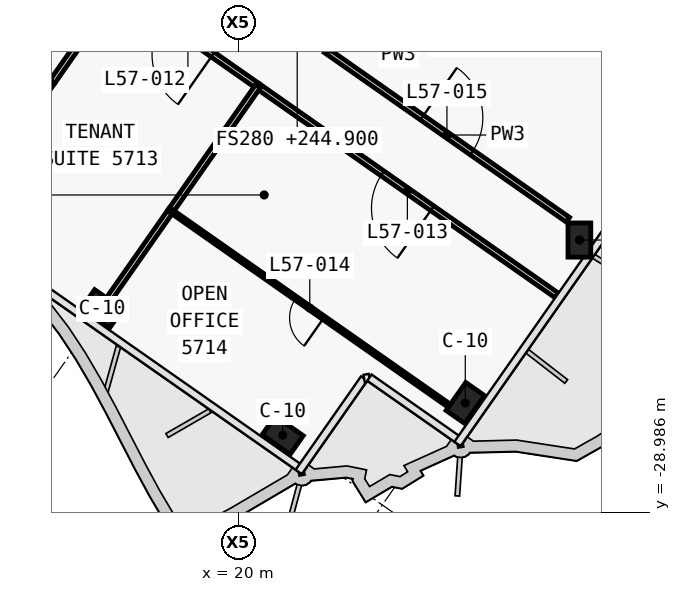
"""IFC4 building model, lengths in metres.
Left out: names, types, materials, properties, quantities, classifications, styles, units other than length and angle.
Written with IfcOpenShell. Run it as: python <this file> out.ifc"""

import sys

from ifc_helpers import new_model, si_unit, direction, frame, frame_2d, origin, origin_2d, place, context, subcontext, project, spatial, rectangle, extrude, clip, halfspace, element, fill, save


model = new_model("IFC4")
c1 = context("Model", 3, precision=1e-05, world=origin(), true_north=direction((0.0, 1.0)))
c2 = subcontext(c1, "Body", "Model", "MODEL_VIEW")
j1 = project(units=[si_unit("LENGTHUNIT", "METRE"), si_unit("PLANEANGLEUNIT", "RADIAN")], contexts=[c1])
p1 = place(None, origin())
s1 = spatial("IfcSite", under=j1, at=p1, CompositionType="ELEMENT")
p2 = place(p1, origin())
s2 = spatial("IfcBuilding", under=s1, at=p2, CompositionType="ELEMENT")
p3 = place(p2, frame((0.0, 0.0, 244.9)))
s3 = spatial("IfcBuildingStorey", under=s2, at=p3, CompositionType="ELEMENT", Elevation=244.9)
for number, where, z_axis, x_axis in (
    (1, (16.41, -23.637, 0.0), (0.0, 0.0, 1.0), (0.819, -0.574, 0.0)),
    (2, (21.161, -26.964, 0.0), (0.0, 0.0, 1.0), (0.819, -0.574, 0.0)),
    (3, (25.966, -26.117, 0.0), (0.0, 0.0, 1.0), (0.574, 0.819, 0.0)),
):
    element("IfcColumn", number, at=place(p3, frame(where, z_axis=z_axis, x_axis=x_axis)), inside=s3, PredefinedType="COLUMN", context=c2, shape_type="SweptSolid", body=[
        extrude(rectangle(XDim=0.9, YDim=0.6, at=origin_2d()), origin(), (0.0, 0.0, 1.0), 3.9),
    ])
p4 = place(p3, frame((28.891, -21.939, 0.0), z_axis=(0.291425634489, 0.416156539042, 0.861327367831), x_axis=(0.494070855631, 0.705534424526, -0.508050357174)))
e4 = element("IfcColumn", 4, at=p4, inside=s3, PredefinedType="COLUMN", context=c2, shape_type="Clipping", body=[
    clip(clip(extrude(rectangle(XDim=0.9, YDim=0.6, at=origin_2d()), origin(), (0.0, 0.0, 1.0), 4.528), halfspace(frame((0.0, 0.0, 0.265), z_axis=(0.0, 0.0, 1.0), x_axis=(1.0, 0.0, 0.0)), True)), halfspace(frame((0.0, 0.0, 4.262), z_axis=(0.0, 0.0, 1.0), x_axis=(1.0, 0.0, 0.0)), False)),
])
p5 = place(p3, frame((22.3, -16.835, 0.0), z_axis=(0.0, 0.0, 1.0), x_axis=(0.819153708931, -0.573574058989, 0.0)))
e5 = element("IfcWall", 5, at=p5, inside=s3, PredefinedType="PARTITIONING", context=c2, shape_type="SweptSolid", body=[
    extrude(rectangle(XDim=7.773, YDim=0.15, at=frame_2d((3.887, 0.0))), origin(), (0.0, 0.0, 1.0), 3.05),
])
p6 = place(p5, frame((3.087, 0.0, 0.0)))
e6 = element("IfcOpeningElement", 6, at=p6, cuts=e5, PredefinedType="OPENING", context=c2, shape_type="SweptSolid", body=[
    extrude(rectangle(XDim=1.6, YDim=2.1, at=frame_2d((0.8, 1.05))), frame((0.0, 0.085, 0.0), z_axis=(0.0, -1.0, 0.0), x_axis=(1.0, 0.0, 0.0)), (0.0, 0.0, 1.0), 0.17),
])
p7 = place(p3, frame((20.513, -17.781, 0.0), z_axis=(0.0, 0.0, 1.0), x_axis=(-0.819165703328, 0.573556928727, 0.0)))
e7 = element("IfcWall", 7, at=p7, inside=s3, PredefinedType="PARTITIONING", context=c2, shape_type="SweptSolid", body=[
    extrude(rectangle(XDim=4.504, YDim=0.15, at=frame_2d((2.252, 0.0))), origin(), (0.0, 0.0, 1.0), 3.05),
])
p8 = place(p7, frame((1.452, 0.0, 0.0)))
e8 = element("IfcOpeningElement", 8, at=p8, cuts=e7, PredefinedType="OPENING", context=c2, shape_type="SweptSolid", body=[
    extrude(rectangle(XDim=1.6, YDim=2.1, at=frame_2d((0.8, 1.05))), frame((0.0, 0.085, 0.0), z_axis=(0.0, -1.0, 0.0), x_axis=(1.0, 0.0, 0.0)), (0.0, 0.0, 1.0), 0.17),
])
p9 = place(p3, frame((28.375, -23.287, 0.0), z_axis=(0.0, 0.0, 1.0), x_axis=(-0.819147101588, 0.573583495196, 0.0)))
e9 = element("IfcWall", 9, at=p9, inside=s3, PredefinedType="PARTITIONING", context=c2, shape_type="SweptSolid", body=[
    extrude(rectangle(XDim=9.602, YDim=0.15, at=frame_2d((4.801, 0.0))), origin(), (0.0, 0.0, 1.0), 3.0),
])
p10 = place(p9, frame((4.001, 0.0, 0.0)))
e10 = element("IfcOpeningElement", 10, at=p10, cuts=e9, PredefinedType="OPENING", context=c2, shape_type="SweptSolid", body=[
    extrude(rectangle(XDim=1.6, YDim=2.1, at=frame_2d((0.8, 1.05))), frame((0.0, 0.085, 0.0), z_axis=(0.0, -1.0, 0.0), x_axis=(1.0, 0.0, 0.0)), (0.0, 0.0, 1.0), 0.17),
])
p11 = place(p3, frame((29.065, -15.467, 0.0), z_axis=(0.0, 0.0, 1.0), x_axis=(0.819143686935, -0.573588371704, 0.0)))
e11 = element("IfcWall", 11, at=p11, inside=s3, PredefinedType="PARTITIONING", context=c2, shape_type="SweptSolid", body=[
    extrude(rectangle(XDim=3.25, YDim=0.1, at=frame_2d((1.625, 0.0))), origin(), (0.0, 0.0, 1.0), 3.0),
])
p12 = place(p3, frame((22.301, -16.836, 0.0), z_axis=(0.0, 0.0, 1.0), x_axis=(0.746924703007, 0.664908631345, 0.0)))
e12 = element("IfcWall", 12, at=p12, inside=s3, PredefinedType="PARTITIONING", context=c2, shape_type="SweptSolid", body=[
    extrude(rectangle(XDim=2.364, YDim=0.15, at=frame_2d((1.182, 0.0))), origin(), (0.0, 0.0, 1.0), 3.62),
])
p13 = place(p3, frame((15.104, -17.657, 0.0), z_axis=(0.0, 0.0, 1.0), x_axis=(-0.819137093595, 0.573597787563, 0.0)))
e13 = element("IfcWall", 13, at=p13, inside=s3, PredefinedType="PARTITIONING", context=c2, shape_type="SweptSolid", body=[
    extrude(rectangle(XDim=7.5, YDim=0.1, at=frame_2d((3.75, 0.0))), origin(), (0.0, 0.0, 1.0), 3.05),
])
p14 = place(p13, frame((3.3, 0.0, 0.0)))
e14 = element("IfcOpeningElement", 14, at=p14, cuts=e13, PredefinedType="OPENING", context=c2, shape_type="SweptSolid", body=[
    extrude(rectangle(XDim=0.9, YDim=2.1, at=frame_2d((0.45, 1.05))), frame((0.0, 0.06, 0.0), z_axis=(0.0, -1.0, 0.0), x_axis=(1.0, 0.0, 0.0)), (0.0, 0.0, 1.0), 0.12),
])
p15 = place(p3, frame((15.104, -17.657, 0.0), z_axis=(0.0, 0.0, 1.0), x_axis=(-0.573553393703, -0.819168178442, 0.0)))
e15 = element("IfcWall", 15, at=p15, inside=s3, PredefinedType="PARTITIONING", context=c2, shape_type="SweptSolid", body=[
    extrude(rectangle(XDim=4.499, YDim=0.15, at=frame_2d((2.25, 0.0))), origin(), (0.0, 0.0, 1.0), 3.0),
])
p16 = place(p3, frame((16.825, -15.199, 0.0), z_axis=(0.0, 0.0, 1.0), x_axis=(-0.573598887793, -0.819136323161, 0.0)))
e16 = element("IfcWall", 16, at=p16, inside=s3, PredefinedType="PARTITIONING", context=c2, shape_type="SweptSolid", body=[
    extrude(rectangle(XDim=3.0, YDim=0.15, at=frame_2d((1.5, 0.0))), origin(), (0.0, 0.0, 1.0), 3.62),
])
p17 = place(p3, frame((18.217, -21.056, 0.0), z_axis=(0.0, 0.0, 1.0), x_axis=(-0.573560731169, -0.819163040952, 0.0)))
e17 = element("IfcWall", 17, at=p17, inside=s3, PredefinedType="PARTITIONING", context=c2, shape_type="SweptSolid", body=[
    extrude(rectangle(XDim=2.831, YDim=0.15, at=frame_2d((1.416, 0.0))), origin(), (0.0, 0.0, 1.0), 3.05),
])
p18 = place(p3, frame((20.511, -17.78, 0.0), z_axis=(0.0, 0.0, 1.0), x_axis=(-0.573589265117, -0.819143061341, 0.0)))
e18 = element("IfcWall", 18, at=p18, inside=s3, PredefinedType="PARTITIONING", context=c2, shape_type="SweptSolid", body=[
    extrude(rectangle(XDim=4.002, YDim=0.15, at=frame_2d((2.001, 0.0))), origin(), (0.0, 0.0, 1.0), 3.05),
])
p19 = place(p3, frame((25.531, -26.18, 0.0), z_axis=(0.0, 0.0, 1.0), x_axis=(-0.819147140662, 0.573583439393, 0.0)))
e19 = element("IfcWall", 19, at=p19, inside=s3, PredefinedType="PARTITIONING", context=c2, shape_type="SweptSolid", body=[
    extrude(rectangle(XDim=8.93, YDim=0.1, at=frame_2d((4.465, 0.0))), origin(), (0.0, 0.0, 1.0), 3.0),
])
p20 = place(p19, frame((4.015, 0.0, 0.0)))
e20 = element("IfcOpeningElement", 20, at=p20, cuts=e19, PredefinedType="OPENING", context=c2, shape_type="SweptSolid", body=[
    extrude(rectangle(XDim=0.9, YDim=2.1, at=frame_2d((0.45, 1.05))), frame((0.0, 0.06, 0.0), z_axis=(0.0, -1.0, 0.0), x_axis=(1.0, 0.0, 0.0)), (0.0, 0.0, 1.0), 0.12),
])
p21 = place(p8, origin())
e21 = element("IfcDoor", 21, at=p21, inside=s3, OperationType="DOUBLE_DOOR_SINGLE_SWING", PredefinedType="DOOR", context=c2, shape_type="SweptSolid", body=[
    extrude(rectangle(XDim=1.6, YDim=2.1, at=frame_2d((0.8, 1.05))), frame((0.0, 0.025, 0.0), z_axis=(0.0, -1.0, 0.0), x_axis=(1.0, 0.0, 0.0)), (0.0, 0.0, 1.0), 0.05),
])
fill(e8, e21)
p22 = place(p10, origin())
e22 = element("IfcDoor", 22, at=p22, inside=s3, OperationType="DOUBLE_DOOR_SINGLE_SWING", PredefinedType="DOOR", context=c2, shape_type="SweptSolid", body=[
    extrude(rectangle(XDim=1.6, YDim=2.1, at=frame_2d((0.8, 1.05))), frame((0.0, 0.025, 0.0), z_axis=(0.0, -1.0, 0.0), x_axis=(1.0, 0.0, 0.0)), (0.0, 0.0, 1.0), 0.05),
])
fill(e10, e22)
p23 = place(p20, origin())
e23 = element("IfcDoor", 23, at=p23, inside=s3, OperationType="SINGLE_SWING_LEFT", PredefinedType="DOOR", context=c2, shape_type="SweptSolid", body=[
    extrude(rectangle(XDim=0.9, YDim=2.1, at=frame_2d((0.45, 1.05))), frame((0.0, 0.025, 0.0), z_axis=(0.0, -1.0, 0.0), x_axis=(1.0, 0.0, 0.0)), (0.0, 0.0, 1.0), 0.05),
])
fill(e20, e23)
p24 = place(p6, origin())
e24 = element("IfcDoor", 24, at=p24, inside=s3, OperationType="DOUBLE_DOOR_SINGLE_SWING", PredefinedType="DOOR", context=c2, shape_type="SweptSolid", body=[
    extrude(rectangle(XDim=1.6, YDim=2.1, at=frame_2d((0.8, 1.05))), frame((0.0, 0.025, 0.0), z_axis=(0.0, -1.0, 0.0), x_axis=(1.0, 0.0, 0.0)), (0.0, 0.0, 1.0), 0.05),
])
fill(e6, e24)
save(model, sys.argv[1])
